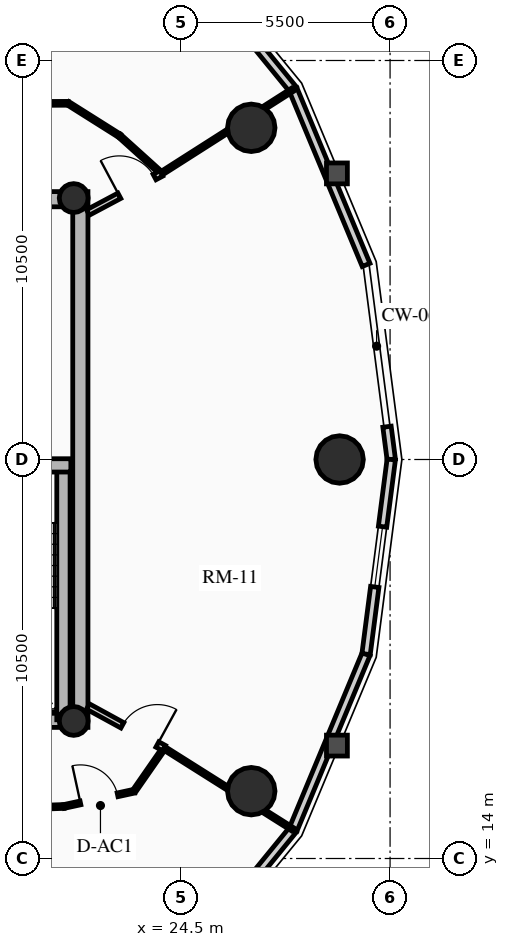
"""IFC4 building model, lengths in metres.
Left out: names, types, materials, properties, quantities, classifications, styles, units other than length and angle.
Written with IfcOpenShell. Run it as: python <this file> out.ifc"""

import sys

from ifc_helpers import new_model, si_unit, direction, frame, frame_2d, origin, origin_2d, place, context, subcontext, project, spatial, rectangle, circle, hollow_circle, extrude, source, transform, mapped, element, fill, save


model = new_model("IFC4")
c1 = context("Model", 3, precision=1e-05, world=origin(), true_north=direction((0.0, 1.0)))
c2 = subcontext(c1, "Body", "Model", "MODEL_VIEW")
j1 = project(units=[si_unit("LENGTHUNIT", "METRE"), si_unit("PLANEANGLEUNIT", "RADIAN")], contexts=[c1])
p1 = place(None, origin())
s1 = spatial("IfcSite", under=j1, at=p1, CompositionType="ELEMENT")
p2 = place(p1, origin())
s2 = spatial("IfcBuilding", under=s1, at=p2, CompositionType="ELEMENT")
p3 = place(p2, frame((0.0, 0.0, 189.43)))
s3 = spatial("IfcBuildingStorey", under=s2, at=p3, CompositionType="ELEMENT", Elevation=189.43)
p4 = place(p3, frame((21.85, 17.45, 0.0), z_axis=(0.0, 0.0, 1.0), x_axis=(0.0, 1.0, 0.0)))
e1 = element("IfcWall", 1, at=p4, inside=s3, PredefinedType="SHEAR", context=c2, shape_type="SweptSolid", body=[
    extrude(rectangle(XDim=14.1, YDim=0.4, at=frame_2d((7.05, 0.0))), origin(), (0.0, 0.0, 1.0), 2.91),
])
p5 = place(p3, frame((11.15, 17.65, 0.0), z_axis=(0.0, 0.0, 1.0), x_axis=(1.0, 0.0, 0.0)))
e2 = element("IfcWall", 2, at=p5, inside=s3, PredefinedType="SHEAR", context=c2, shape_type="SweptSolid", body=[
    extrude(rectangle(XDim=10.7, YDim=0.4, at=frame_2d((5.35, 0.0))), origin(), (0.0, 0.0, 1.0), 2.91),
])
m1 = source(origin(), c2, "Body", "SweptSolid", [
    extrude(rectangle(XDim=1.5, YDim=2.02, at=frame_2d((0.75, 1.01))), frame((0.0, 0.21, 0.0), z_axis=(0.0, -1.0, 0.0), x_axis=(1.0, 0.0, 0.0)), (0.0, 0.0, 1.0), 0.42),
])
p6 = place(p5, frame((5.45, 0.0, 0.0)))
e3 = element("IfcOpeningElement", 3, at=p6, cuts=e2, PredefinedType="OPENING", context=c2, shape_type="MappedRepresentation", body=[
    mapped(m1, transform((0.0, 0.0, 0.0), x_axis=(1.0, 0.0, 0.0), y_axis=(0.0, 1.0, 0.0), z_axis=(0.0, 0.0, 1.0), scale=1.0)),
])
p7 = place(p3, frame((11.15, 31.35, 0.0), z_axis=(0.0, 0.0, 1.0), x_axis=(1.0, 0.0, 0.0)))
e4 = element("IfcWall", 4, at=p7, inside=s3, PredefinedType="SHEAR", context=c2, shape_type="SweptSolid", body=[
    extrude(rectangle(XDim=10.7, YDim=0.4, at=frame_2d((5.35, 0.0))), origin(), (0.0, 0.0, 1.0), 2.91),
])
p8 = place(p7, frame((4.6, 0.0, 0.0)))
e5 = element("IfcOpeningElement", 5, at=p8, cuts=e4, PredefinedType="OPENING", context=c2, shape_type="MappedRepresentation", body=[
    mapped(m1, transform((0.0, 0.0, 0.0), x_axis=(1.0, 0.0, 0.0), y_axis=(0.0, 1.0, 0.0), z_axis=(0.0, 0.0, 1.0), scale=1.0)),
])
p9 = place(p3, frame((21.405, 17.65, 0.0), z_axis=(0.0, 0.0, 1.0), x_axis=(0.0, 1.0, 0.0)))
e6 = element("IfcWall", 6, at=p9, inside=s3, PredefinedType="SHEAR", context=c2, shape_type="SweptSolid", body=[
    extrude(rectangle(XDim=6.695, YDim=0.35, at=frame_2d((3.348, 0.0))), origin(), (0.0, 0.0, 1.0), 2.91),
])
p10 = place(p3, frame((18.315, 24.345, 0.0), z_axis=(0.0, 0.0, 1.0), x_axis=(1.0, 0.0, 0.0)))
e7 = element("IfcWall", 7, at=p10, inside=s3, PredefinedType="SHEAR", context=c2, shape_type="SweptSolid", body=[
    extrude(rectangle(XDim=3.285, YDim=0.35, at=frame_2d((1.643, 0.0))), origin(), (0.0, 0.0, 1.0), 2.91),
])
for number, where, z_axis, x_axis in (
    (8, (21.675, 17.62, 0.0), (0.0, 0.0, 1.0), (1.0, 0.0, 0.0)),
    (9, (21.675, 31.38, 0.0), (0.0, 0.0, 1.0), (1.0, 0.0, 0.0)),
):
    element("IfcColumn", number, at=place(p3, frame(where, z_axis=z_axis, x_axis=x_axis)), inside=s3, PredefinedType="COLUMN", context=c2, shape_type="SweptSolid", body=[
        extrude(hollow_circle(Radius=0.38, WallThickness=0.032, at=origin_2d()), origin(), (0.0, 0.0, 1.0), 2.91),
    ])
for number, where, z_axis, x_axis in (
    (10, (28.672, 24.5, 0.0), (0.0, 0.0, 1.0), (1.0, 0.0, 0.0)),
    (11, (26.347, 33.229, 0.0), (0.0, 0.0, 1.0), (1.0, 0.0, 0.0)),
    (12, (26.347, 15.771, 0.0), (0.0, 0.0, 1.0), (1.0, 0.0, 0.0)),
):
    element("IfcColumn", number, at=place(p3, frame(where, z_axis=z_axis, x_axis=x_axis)), inside=s3, PredefinedType="USERDEFINED", context=c2, shape_type="SweptSolid", body=[
        extrude(circle(Radius=0.625, at=origin_2d()), origin(), (0.0, 0.0, 1.0), 2.91),
    ])
p11 = place(p3, frame((29.919, 25.363, 0.0), z_axis=(0.0, 0.0, 1.0), x_axis=(0.128247365719, -0.991742211054, 0.0)))
e13 = element("IfcWall", 13, at=p11, inside=s3, PredefinedType="SOLIDWALL", context=c2, shape_type="SweptSolid", body=[
    extrude(rectangle(XDim=0.87, YDim=0.22, at=frame_2d((0.435, 0.0))), origin(), (0.0, 0.0, 1.0), 2.555),
])
p12 = place(p3, frame((27.447, 34.24, 0.0), z_axis=(0.0, 0.0, 1.0), x_axis=(0.384144094086, -0.923273152961, 0.0)))
e14 = element("IfcWall", 14, at=p12, inside=s3, PredefinedType="SOLIDWALL", context=c2, shape_type="SweptSolid", body=[
    extrude(rectangle(XDim=5.003, YDim=0.22, at=frame_2d((2.501, 0.0))), origin(), (0.0, 0.0, 1.0), 2.125),
])
p13 = place(p3, frame((24.453, 37.906, 0.0), z_axis=(0.0, 0.0, 1.0), x_axis=(0.632470615287, -0.774584353572, 0.0)))
e15 = element("IfcWall", 15, at=p13, inside=s3, PredefinedType="SOLIDWALL", context=c2, shape_type="SweptSolid", body=[
    extrude(rectangle(XDim=4.733, YDim=0.22, at=frame_2d((2.366, 0.0))), origin(), (0.0, 0.0, 1.0), 2.125),
])
m2 = source(origin(), c2, "Body", "SweptSolid", [
    extrude(rectangle(XDim=1.6, YDim=1.3, at=frame_2d((0.8, 0.65))), frame((0.0, 0.12, 0.0), z_axis=(0.0, -1.0, 0.0), x_axis=(1.0, 0.0, 0.0)), (0.0, 0.0, 1.0), 0.24),
])
p14 = place(p13, frame((1.566, 0.0, 0.65)))
e16 = element("IfcOpeningElement", 16, at=p14, cuts=e15, PredefinedType="OPENING", context=c2, shape_type="MappedRepresentation", body=[
    mapped(m2, transform((0.0, 0.0, 0.0), x_axis=(1.0, 0.0, 0.0), y_axis=(0.0, 1.0, 0.0), z_axis=(0.0, 0.0, 1.0), scale=1.0)),
])
p15 = place(p3, frame((27.447, 14.76, 0.0), z_axis=(0.0, 0.0, 1.0), x_axis=(-0.632470615287, -0.774584353572, 0.0)))
e17 = element("IfcWall", 17, at=p15, inside=s3, PredefinedType="SOLIDWALL", context=c2, shape_type="SweptSolid", body=[
    extrude(rectangle(XDim=4.733, YDim=0.22, at=frame_2d((2.366, 0.0))), origin(), (0.0, 0.0, 1.0), 2.125),
])
p16 = place(p15, frame((1.566, 0.0, 0.65)))
e18 = element("IfcOpeningElement", 18, at=p16, cuts=e17, PredefinedType="OPENING", context=c2, shape_type="MappedRepresentation", body=[
    mapped(m2, transform((0.0, 0.0, 0.0), x_axis=(1.0, 0.0, 0.0), y_axis=(0.0, 1.0, 0.0), z_axis=(0.0, 0.0, 1.0), scale=1.0)),
])
p17 = place(p3, frame((29.369, 19.38, 0.0), z_axis=(0.0, 0.0, 1.0), x_axis=(-0.384144094086, -0.923273152961, 0.0)))
e19 = element("IfcWall", 19, at=p17, inside=s3, PredefinedType="SOLIDWALL", context=c2, shape_type="SweptSolid", body=[
    extrude(rectangle(XDim=5.003, YDim=0.22, at=frame_2d((2.501, 0.0))), origin(), (0.0, 0.0, 1.0), 2.125),
])
p18 = place(p3, frame((30.031, 24.5, 0.0), z_axis=(0.0, 0.0, 1.0), x_axis=(-0.128287912609, -0.991736966881, 0.0)))
e20 = element("IfcWall", 20, at=p18, inside=s3, PredefinedType="SOLIDWALL", context=c2, shape_type="SweptSolid", body=[
    extrude(rectangle(XDim=5.163, YDim=0.22, at=frame_2d((2.582, 0.0))), origin(), (0.0, 0.0, 1.0), 2.125),
])
p19 = place(p18, frame((1.782, 0.0, 0.65)))
e21 = element("IfcOpeningElement", 21, at=p19, cuts=e20, PredefinedType="OPENING", context=c2, shape_type="MappedRepresentation", body=[
    mapped(m2, transform((0.0, 0.0, 0.0), x_axis=(1.0, 0.0, 0.0), y_axis=(0.0, 1.0, 0.0), z_axis=(0.0, 0.0, 1.0), scale=1.0)),
])
p20 = place(p3, frame((23.98, 32.027, 0.0), z_axis=(0.0, 0.0, 1.0), x_axis=(-0.742353224332, 0.670008724065, 0.0)))
e22 = element("IfcWall", 22, at=p20, inside=s3, PredefinedType="MOVABLE", context=c2, shape_type="SweptSolid", body=[
    extrude(rectangle(XDim=1.485, YDim=0.1, at=frame_2d((0.742, 0.0))), origin(), (0.0, 0.0, 1.0), 2.125),
])
p21 = place(p3, frame((22.877, 33.022, 0.0), z_axis=(0.0, 0.0, 1.0), x_axis=(-0.845895608855, 0.533348496689, 0.0)))
e23 = element("IfcWall", 23, at=p21, inside=s3, PredefinedType="MOVABLE", context=c2, shape_type="SweptSolid", body=[
    extrude(rectangle(XDim=1.597, YDim=0.1, at=frame_2d((0.798, 0.0))), origin(), (0.0, 0.0, 1.0), 2.125),
])
p22 = place(p3, frame((21.527, 33.873, 0.0), z_axis=(0.0, 0.0, 1.0), x_axis=(-0.999991838845, -0.004040079574, 0.0)))
e24 = element("IfcWall", 24, at=p22, inside=s3, PredefinedType="MOVABLE", context=c2, shape_type="SweptSolid", body=[
    extrude(rectangle(XDim=3.384, YDim=0.1, at=frame_2d((1.692, 0.0))), origin(), (0.0, 0.0, 1.0), 2.125),
])
p23 = place(p3, frame((14.781, 15.141, 0.0), z_axis=(0.0, 0.0, 1.0), x_axis=(0.999407918707, 0.034406569513, 0.0)))
e25 = element("IfcWall", 25, at=p23, inside=s3, PredefinedType="MOVABLE", context=c2, shape_type="SweptSolid", body=[
    extrude(rectangle(XDim=6.642, YDim=0.1, at=frame_2d((3.321, 0.0))), origin(), (0.0, 0.0, 1.0), 2.125),
])
p24 = place(p3, frame((21.419, 15.369, 0.0), z_axis=(0.0, 0.0, 1.0), x_axis=(0.977192701953, 0.212354475464, 0.0)))
e26 = element("IfcWall", 26, at=p24, inside=s3, PredefinedType="MOVABLE", context=c2, shape_type="SweptSolid", body=[
    extrude(rectangle(XDim=1.888, YDim=0.1, at=frame_2d((0.944, 0.0))), origin(), (0.0, 0.0, 1.0), 2.125),
])
m3 = source(origin(), c2, "Body", "SweptSolid", [
    extrude(rectangle(XDim=1.0, YDim=2.015, at=frame_2d((0.5, 1.007))), frame((0.0, 0.06, 0.0), z_axis=(0.0, -1.0, 0.0), x_axis=(1.0, 0.0, 0.0)), (0.0, 0.0, 1.0), 0.12),
])
p25 = place(p24, frame((0.444, 0.0, 0.0)))
e27 = element("IfcOpeningElement", 27, at=p25, cuts=e26, PredefinedType="OPENING", context=c2, shape_type="MappedRepresentation", body=[
    mapped(m3, transform((0.0, 0.0, 0.0), x_axis=(1.0, 0.0, 0.0), y_axis=(0.0, 1.0, 0.0), z_axis=(0.0, 0.0, 1.0), scale=1.0)),
])
p26 = place(p3, frame((23.263, 15.77, 0.0), z_axis=(0.0, 0.0, 1.0), x_axis=(0.570743456919, 0.821128434768, 0.0)))
e28 = element("IfcWall", 28, at=p26, inside=s3, PredefinedType="MOVABLE", context=c2, shape_type="SweptSolid", body=[
    extrude(rectangle(XDim=1.382, YDim=0.1, at=frame_2d((0.691, 0.0))), origin(), (0.0, 0.0, 1.0), 2.125),
])
p27 = place(p3, frame((23.98, 32.027, 0.0), z_axis=(0.0, 0.0, 1.0), x_axis=(0.843120722145, 0.53772432332, 0.0)))
e29 = element("IfcWall", 29, at=p27, inside=s3, PredefinedType="MOVABLE", context=c2, shape_type="SweptSolid", body=[
    extrude(rectangle(XDim=4.093, YDim=0.1, at=frame_2d((2.046, 0.0))), origin(), (0.0, 0.0, 1.0), 2.125),
])
p28 = place(p3, frame((24.052, 16.905, 0.0), z_axis=(0.0, 0.0, 1.0), x_axis=(0.845666007609, -0.533712472755, 0.0)))
e30 = element("IfcWall", 30, at=p28, inside=s3, PredefinedType="MOVABLE", context=c2, shape_type="SweptSolid", body=[
    extrude(rectangle(XDim=3.995, YDim=0.1, at=frame_2d((1.998, 0.0))), origin(), (0.0, 0.0, 1.0), 2.125),
])
p29 = place(p3, frame((22.05, 31.0, 0.0), z_axis=(0.0, 0.0, 1.0), x_axis=(0.882791584709, 0.469764853908, 0.0)))
e31 = element("IfcWall", 31, at=p29, inside=s3, PredefinedType="PARTITIONING", context=c2, shape_type="SweptSolid", body=[
    extrude(rectangle(XDim=2.186, YDim=0.16, at=frame_2d((1.093, 0.0))), origin(), (0.0, 0.0, 1.0), 2.125),
])
m4 = source(origin(), c2, "Body", "SweptSolid", [
    extrude(rectangle(XDim=1.05, YDim=2.015, at=frame_2d((0.525, 1.007))), frame((0.0, 0.09, 0.0), z_axis=(0.0, -1.0, 0.0), x_axis=(1.0, 0.0, 0.0)), (0.0, 0.0, 1.0), 0.18),
])
p30 = place(p29, frame((0.936, 0.0, 0.0)))
e32 = element("IfcOpeningElement", 32, at=p30, cuts=e31, PredefinedType="OPENING", context=c2, shape_type="MappedRepresentation", body=[
    mapped(m4, transform((0.0, 0.0, 0.0), x_axis=(1.0, 0.0, 0.0), y_axis=(0.0, 1.0, 0.0), z_axis=(0.0, 0.0, 1.0), scale=1.0)),
])
p31 = place(p3, frame((22.05, 18.0, 0.0), z_axis=(0.0, 0.0, 1.0), x_axis=(0.877252891813, -0.480028503118, 0.0)))
e33 = element("IfcWall", 33, at=p31, inside=s3, PredefinedType="PARTITIONING", context=c2, shape_type="SweptSolid", body=[
    extrude(rectangle(XDim=2.282, YDim=0.16, at=frame_2d((1.141, 0.0))), origin(), (0.0, 0.0, 1.0), 2.125),
])
p32 = place(p31, frame((1.032, 0.0, 0.0)))
e34 = element("IfcOpeningElement", 34, at=p32, cuts=e33, PredefinedType="OPENING", context=c2, shape_type="MappedRepresentation", body=[
    mapped(m4, transform((0.0, 0.0, 0.0), x_axis=(1.0, 0.0, 0.0), y_axis=(0.0, 1.0, 0.0), z_axis=(0.0, 0.0, 1.0), scale=1.0)),
])
m5 = source(origin(), c2, "Body", "SweptSolid", [
    extrude(rectangle(XDim=1.6, YDim=1.3, at=frame_2d((0.8, 0.65))), frame((0.0, 0.03, 0.0), z_axis=(0.0, -1.0, 0.0), x_axis=(1.0, 0.0, 0.0)), (0.0, 0.0, 1.0), 0.06),
])
p33 = place(p19, origin())
e35 = element("IfcWindow", 35, at=p33, inside=s3, PartitioningType="SINGLE_PANEL", PredefinedType="WINDOW", context=c2, shape_type="MappedRepresentation", body=[
    mapped(m5, transform((0.0, 0.0, 0.0), x_axis=(1.0, 0.0, 0.0), y_axis=(0.0, 1.0, 0.0), z_axis=(0.0, 0.0, 1.0), scale=1.0)),
])
fill(e21, e35)
m6 = source(origin(), c2, "Body", "SweptSolid", [
    extrude(rectangle(XDim=1.05, YDim=2.015, at=frame_2d((0.525, 1.007))), frame((0.0, 0.025, 0.0), z_axis=(0.0, -1.0, 0.0), x_axis=(1.0, 0.0, 0.0)), (0.0, 0.0, 1.0), 0.05),
])
p34 = place(p30, origin())
e36 = element("IfcDoor", 36, at=p34, inside=s3, OperationType="SINGLE_SWING_LEFT", PredefinedType="DOOR", context=c2, shape_type="MappedRepresentation", body=[
    mapped(m6, transform((0.0, 0.0, 0.0), x_axis=(1.0, 0.0, 0.0), y_axis=(0.0, 1.0, 0.0), z_axis=(0.0, 0.0, 1.0), scale=1.0)),
])
fill(e32, e36)
p35 = place(p32, origin())
e37 = element("IfcDoor", 37, at=p35, inside=s3, OperationType="SINGLE_SWING_RIGHT", PredefinedType="DOOR", context=c2, shape_type="MappedRepresentation", body=[
    mapped(m6, transform((0.0, 0.0, 0.0), x_axis=(1.0, 0.0, 0.0), y_axis=(0.0, 1.0, 0.0), z_axis=(0.0, 0.0, 1.0), scale=1.0)),
])
fill(e34, e37)
m7 = source(origin(), c2, "Body", "SweptSolid", [
    extrude(rectangle(XDim=1.0, YDim=2.015, at=frame_2d((0.5, 1.007))), frame((0.0, 0.025, 0.0), z_axis=(0.0, -1.0, 0.0), x_axis=(1.0, 0.0, 0.0)), (0.0, 0.0, 1.0), 0.05),
])
p36 = place(p25, origin())
e38 = element("IfcDoor", 38, at=p36, inside=s3, OperationType="SINGLE_SWING_LEFT", PredefinedType="DOOR", context=c2, shape_type="MappedRepresentation", body=[
    mapped(m7, transform((0.0, 0.0, 0.0), x_axis=(1.0, 0.0, 0.0), y_axis=(0.0, 1.0, 0.0), z_axis=(0.0, 0.0, 1.0), scale=1.0)),
])
fill(e27, e38)
save(model, sys.argv[1])
